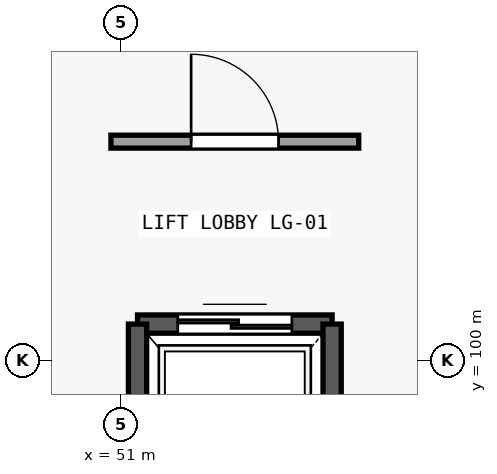
"""IFC4 building model, lengths in metres.
Left out: names, types, materials, properties, quantities, classifications, styles, units other than length and angle.
Written with IfcOpenShell. Run it as: python <this file> out.ifc"""

import sys

from ifc_helpers import new_model, si_unit, direction, frame, frame_2d, origin, place, context, subcontext, project, spatial, rectangle, extrude, element, fill, save


model = new_model("IFC4")
c1 = context("Model", 3, precision=1e-05, world=origin(), true_north=direction((0.0, 1.0)))
c2 = subcontext(c1, "Body", "Model", "MODEL_VIEW")
j1 = project(units=[si_unit("LENGTHUNIT", "METRE"), si_unit("PLANEANGLEUNIT", "RADIAN")], contexts=[c1])
p1 = place(None, origin())
s1 = spatial("IfcSite", under=j1, at=p1, CompositionType="ELEMENT")
p2 = place(p1, origin())
s2 = spatial("IfcBuilding", under=s1, at=p2, CompositionType="ELEMENT")
p3 = place(p2, frame((0.0, 0.0, 5.4)))
s3 = spatial("IfcBuildingStorey", under=s2, at=p3, CompositionType="ELEMENT", Elevation=5.4)
p4 = place(p3, frame((51.22, 100.48, 0.0), z_axis=(0.0, 0.0, 1.0), x_axis=(1.0, 0.0, 0.0)))
e1 = element("IfcWall", 1, at=p4, inside=s3, PredefinedType="SOLIDWALL", context=c2, shape_type="SweptSolid", body=[
    extrude(rectangle(XDim=2.56, YDim=0.24, at=frame_2d((1.28, 0.0))), origin(), (0.0, 0.0, 1.0), 3.64),
])
p5 = place(p4, frame((0.53, 0.0, 0.0)))
e2 = element("IfcOpeningElement", 2, at=p5, cuts=e1, PredefinedType="OPENING", context=c2, shape_type="SweptSolid", body=[
    extrude(rectangle(XDim=1.5, YDim=2.25, at=frame_2d((0.75, 1.125))), frame((0.0, 0.13, 0.0), z_axis=(0.0, -1.0, 0.0), x_axis=(1.0, 0.0, 0.0)), (0.0, 0.0, 1.0), 0.26),
])
for number, where, z_axis, x_axis in (
    (3, (51.22, 97.52, 0.0), (0.0, 0.0, 1.0), (0.0, 1.0, 0.0)),
    (4, (53.78, 100.48, 0.0), (0.0, 0.0, 1.0), (0.0, -1.0, 0.0)),
):
    element("IfcWall", number, at=place(p3, frame(where, z_axis=z_axis, x_axis=x_axis)), inside=s3, PredefinedType="SOLIDWALL", context=c2, shape_type="SweptSolid", body=[
        extrude(rectangle(XDim=2.96, YDim=0.24, at=frame_2d((1.48, 0.0))), origin(), (0.0, 0.0, 1.0), 3.64),
    ])
p6 = place(p3, frame((50.87, 102.88, 0.0), z_axis=(0.0, 0.0, 1.0), x_axis=(1.0, 0.0, 0.0)))
e5 = element("IfcWall", 5, at=p6, inside=s3, PredefinedType="PARTITIONING", context=c2, shape_type="SweptSolid", body=[
    extrude(rectangle(XDim=3.26, YDim=0.17, at=frame_2d((1.63, 0.0))), origin(), (0.0, 0.0, 1.0), 3.64),
])
p7 = place(p6, frame((1.055, 0.0, 0.0)))
e6 = element("IfcOpeningElement", 6, at=p7, cuts=e5, PredefinedType="OPENING", context=c2, shape_type="SweptSolid", body=[
    extrude(rectangle(XDim=1.15, YDim=2.15, at=frame_2d((0.575, 1.075))), frame((0.0, 0.095, 0.0), z_axis=(0.0, -1.0, 0.0), x_axis=(1.0, 0.0, 0.0)), (0.0, 0.0, 1.0), 0.19),
])
p8 = place(p5, origin())
e7 = element("IfcDoor", 7, at=p8, inside=s3, OperationType="DOUBLE_DOOR_SLIDING", PredefinedType="DOOR", context=c2, shape_type="SweptSolid", body=[
    extrude(rectangle(XDim=1.5, YDim=2.25, at=frame_2d((0.75, 1.125))), frame((0.0, 0.025, 0.0), z_axis=(0.0, -1.0, 0.0), x_axis=(1.0, 0.0, 0.0)), (0.0, 0.0, 1.0), 0.05),
])
fill(e2, e7)
p9 = place(p7, origin())
e8 = element("IfcDoor", 8, at=p9, inside=s3, OperationType="SINGLE_SWING_LEFT", PredefinedType="DOOR", context=c2, shape_type="SweptSolid", body=[
    extrude(rectangle(XDim=1.15, YDim=2.15, at=frame_2d((0.575, 1.075))), frame((0.0, 0.025, 0.0), z_axis=(0.0, -1.0, 0.0), x_axis=(1.0, 0.0, 0.0)), (0.0, 0.0, 1.0), 0.05),
])
fill(e6, e8)
save(model, sys.argv[1])
